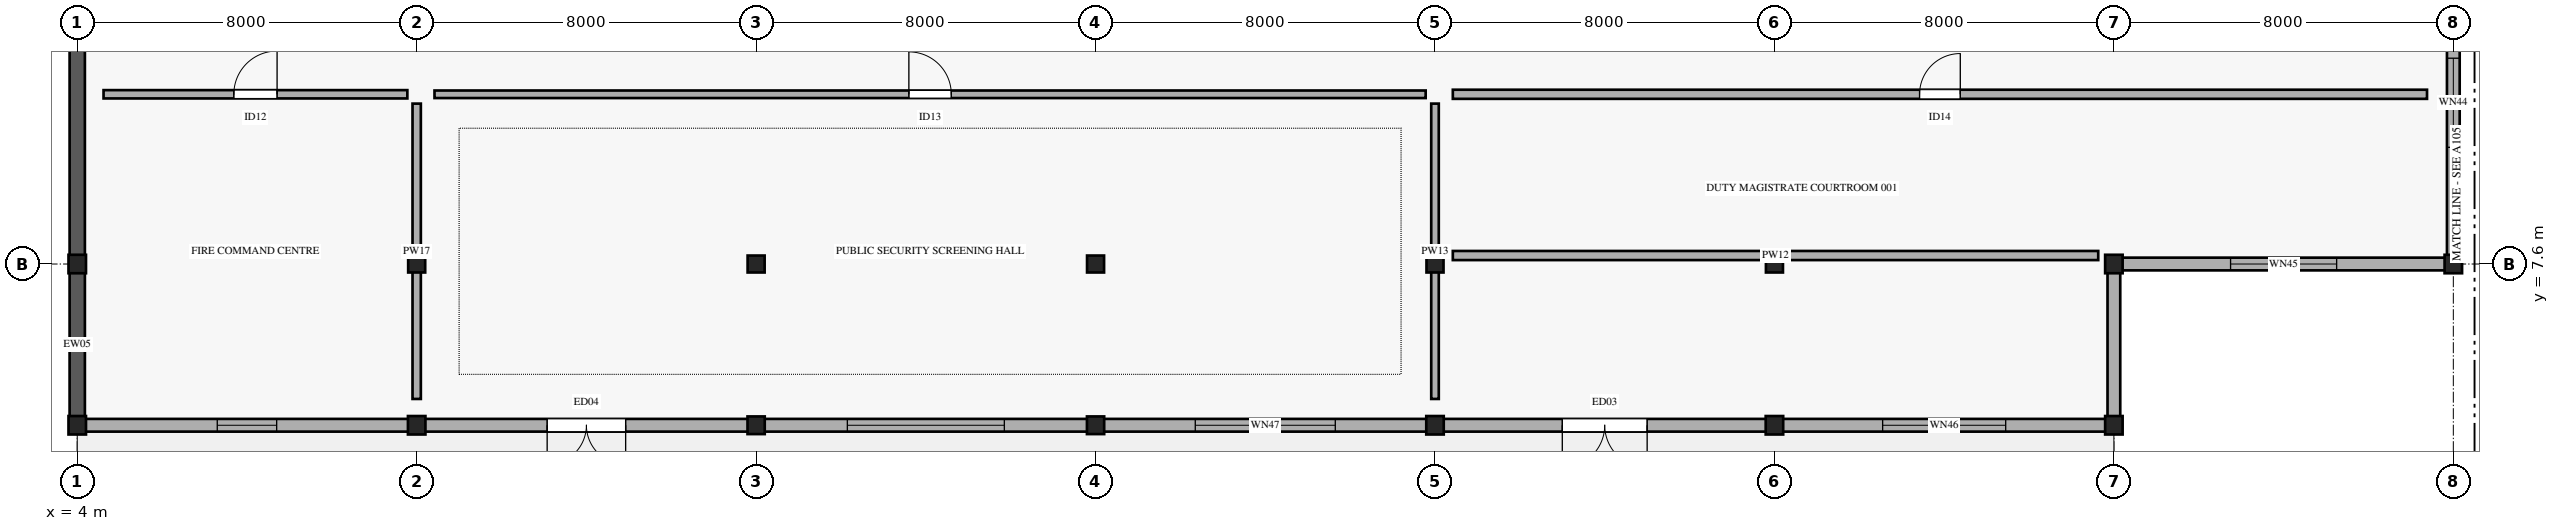
"""IFC4 building model, lengths in metres.
Left out: names, types, materials, properties, quantities, classifications, styles, units other than length and angle.
Written with IfcOpenShell. Run it as: python <this file> out.ifc"""

import sys

from ifc_helpers import new_model, si_unit, direction, frame, frame_2d, origin, origin_2d, place, context, subcontext, project, spatial, rectangle, i_section, extrude, element, fill, save


model = new_model("IFC4")
c1 = context("Model", 3, precision=1e-05, world=origin(), true_north=direction((0.0, 1.0)))
c2 = subcontext(c1, "Body", "Model", "MODEL_VIEW")
j1 = project(units=[si_unit("LENGTHUNIT", "METRE"), si_unit("PLANEANGLEUNIT", "RADIAN")], contexts=[c1])
p1 = place(None, origin())
s1 = spatial("IfcSite", under=j1, at=p1, CompositionType="ELEMENT")
p2 = place(p1, origin())
s2 = spatial("IfcBuilding", under=s1, at=p2, CompositionType="ELEMENT")
p3 = place(p2, origin())
s3 = spatial("IfcBuildingStorey", under=s2, at=p3, CompositionType="ELEMENT", Elevation=0.0)
for number, where, z_axis, x_axis in (
    (1, (4.0, 3.8, 0.0), (0.0, 0.0, 1.0), (1.0, 0.0, 0.0)),
    (2, (4.0, 7.6, 0.0), (0.0, 0.0, 1.0), (1.0, 0.0, 0.0)),
    (3, (12.0, 3.8, 0.0), (0.0, 0.0, 1.0), (1.0, 0.0, 0.0)),
):
    element("IfcColumn", number, at=place(p3, frame(where, z_axis=z_axis, x_axis=x_axis)), inside=s3, PredefinedType="COLUMN", context=c2, shape_type="SweptSolid", body=[
        extrude(i_section(OverallWidth=0.412, OverallDepth=0.435, WebThickness=0.036, FlangeThickness=0.057, FilletRadius=0.015, at=origin_2d()), origin(), (0.0, 0.0, 1.0), 5.185),
    ])
p4 = place(p3, frame((12.0, 7.6, 0.0), z_axis=(0.0, 0.0, 1.0), x_axis=(1.0, 0.0, 0.0)))
e4 = element("IfcColumn", 4, at=p4, inside=s3, PredefinedType="COLUMN", context=c2, shape_type="SweptSolid", body=[
    extrude(i_section(OverallWidth=0.401, OverallDepth=0.399, WebThickness=0.025, FlangeThickness=0.04, FilletRadius=0.015, at=origin_2d()), origin(), (0.0, 0.0, 1.0), 5.185),
])
p5 = place(p3, frame((20.0, 3.8, 0.0), z_axis=(0.0, 0.0, 1.0), x_axis=(1.0, 0.0, 0.0)))
e5 = element("IfcColumn", 5, at=p5, inside=s3, PredefinedType="COLUMN", context=c2, shape_type="SweptSolid", body=[
    extrude(i_section(OverallWidth=0.406, OverallDepth=0.416, WebThickness=0.03, FlangeThickness=0.048, FilletRadius=0.015, at=origin_2d()), origin(), (0.0, 0.0, 1.0), 5.185),
])
p6 = place(p3, frame((20.0, 7.6, 0.0), z_axis=(0.0, 0.0, 1.0), x_axis=(1.0, 0.0, 0.0)))
e6 = element("IfcColumn", 6, at=p6, inside=s3, PredefinedType="COLUMN", context=c2, shape_type="SweptSolid", body=[
    extrude(i_section(OverallWidth=0.401, OverallDepth=0.399, WebThickness=0.025, FlangeThickness=0.04, FilletRadius=0.015, at=origin_2d()), origin(), (0.0, 0.0, 1.0), 5.185),
])
p7 = place(p3, frame((28.0, 3.8, 0.0), z_axis=(0.0, 0.0, 1.0), x_axis=(1.0, 0.0, 0.0)))
e7 = element("IfcColumn", 7, at=p7, inside=s3, PredefinedType="COLUMN", context=c2, shape_type="SweptSolid", body=[
    extrude(i_section(OverallWidth=0.406, OverallDepth=0.416, WebThickness=0.03, FlangeThickness=0.048, FilletRadius=0.015, at=origin_2d()), origin(), (0.0, 0.0, 1.0), 5.185),
])
p8 = place(p3, frame((28.0, 7.6, 0.0), z_axis=(0.0, 0.0, 1.0), x_axis=(1.0, 0.0, 0.0)))
e8 = element("IfcColumn", 8, at=p8, inside=s3, PredefinedType="COLUMN", context=c2, shape_type="SweptSolid", body=[
    extrude(i_section(OverallWidth=0.401, OverallDepth=0.399, WebThickness=0.025, FlangeThickness=0.04, FilletRadius=0.015, at=origin_2d()), origin(), (0.0, 0.0, 1.0), 5.185),
])
p9 = place(p3, frame((36.0, 3.8, 0.0), z_axis=(0.0, 0.0, 1.0), x_axis=(1.0, 0.0, 0.0)))
e9 = element("IfcColumn", 9, at=p9, inside=s3, PredefinedType="COLUMN", context=c2, shape_type="SweptSolid", body=[
    extrude(i_section(OverallWidth=0.412, OverallDepth=0.435, WebThickness=0.036, FlangeThickness=0.057, FilletRadius=0.015, at=origin_2d()), origin(), (0.0, 0.0, 1.0), 5.185),
])
p10 = place(p3, frame((36.0, 7.6, 0.0), z_axis=(0.0, 0.0, 1.0), x_axis=(1.0, 0.0, 0.0)))
e10 = element("IfcColumn", 10, at=p10, inside=s3, PredefinedType="COLUMN", context=c2, shape_type="SweptSolid", body=[
    extrude(i_section(OverallWidth=0.401, OverallDepth=0.399, WebThickness=0.025, FlangeThickness=0.04, FilletRadius=0.015, at=origin_2d()), origin(), (0.0, 0.0, 1.0), 5.185),
])
p11 = place(p3, frame((44.0, 3.8, 0.0), z_axis=(0.0, 0.0, 1.0), x_axis=(1.0, 0.0, 0.0)))
e11 = element("IfcColumn", 11, at=p11, inside=s3, PredefinedType="COLUMN", context=c2, shape_type="SweptSolid", body=[
    extrude(i_section(OverallWidth=0.412, OverallDepth=0.435, WebThickness=0.036, FlangeThickness=0.057, FilletRadius=0.015, at=origin_2d()), origin(), (0.0, 0.0, 1.0), 5.185),
])
p12 = place(p3, frame((44.0, 7.6, 0.0), z_axis=(0.0, 0.0, 1.0), x_axis=(1.0, 0.0, 0.0)))
e12 = element("IfcColumn", 12, at=p12, inside=s3, PredefinedType="COLUMN", context=c2, shape_type="SweptSolid", body=[
    extrude(i_section(OverallWidth=0.401, OverallDepth=0.399, WebThickness=0.025, FlangeThickness=0.04, FilletRadius=0.015, at=origin_2d()), origin(), (0.0, 0.0, 1.0), 5.185),
])
for number, where, z_axis, x_axis in (
    (13, (52.0, 3.8, 0.0), (0.0, 0.0, 1.0), (1.0, 0.0, 0.0)),
    (14, (52.0, 7.6, 0.0), (0.0, 0.0, 1.0), (1.0, 0.0, 0.0)),
    (15, (60.0, 7.6, 0.0), (0.0, 0.0, 1.0), (1.0, 0.0, 0.0)),
):
    element("IfcColumn", number, at=place(p3, frame(where, z_axis=z_axis, x_axis=x_axis)), inside=s3, PredefinedType="COLUMN", context=c2, shape_type="SweptSolid", body=[
        extrude(i_section(OverallWidth=0.412, OverallDepth=0.435, WebThickness=0.036, FlangeThickness=0.057, FilletRadius=0.015, at=origin_2d()), origin(), (0.0, 0.0, 1.0), 5.185),
    ])
p13 = place(p3, frame((4.0, 3.78, 0.0), z_axis=(0.0, 0.0, 1.0), x_axis=(0.0, 1.0, 0.0)))
e16 = element("IfcWall", 16, at=p13, inside=s3, PredefinedType="STANDARD", context=c2, shape_type="SweptSolid", body=[
    extrude(rectangle(XDim=3.84, YDim=0.36, at=frame_2d((1.92, 0.0))), origin(), (0.0, 0.0, 1.0), 5.19),
])
p14 = place(p3, frame((4.0, 7.58, 0.0), z_axis=(0.0, 0.0, 1.0), x_axis=(0.0, 1.0, 0.0)))
e17 = element("IfcWall", 17, at=p14, inside=s3, PredefinedType="STANDARD", context=c2, shape_type="SweptSolid", body=[
    extrude(rectangle(XDim=7.64, YDim=0.36, at=frame_2d((3.82, 0.0))), origin(), (0.0, 0.0, 1.0), 5.19),
])
p15 = place(p3, frame((60.0, 15.22, 0.0), z_axis=(0.0, 0.0, 1.0), x_axis=(0.0, -1.0, 0.0)))
e18 = element("IfcWall", 18, at=p15, inside=s3, PredefinedType="STANDARD", context=c2, shape_type="SweptSolid", body=[
    extrude(rectangle(XDim=7.64, YDim=0.3, at=frame_2d((3.82, 0.0))), origin(), (0.0, 0.0, 1.0), 4.25),
])
p16 = place(p15, frame((2.77, 0.0, 0.75)))
e19 = element("IfcOpeningElement", 19, at=p16, cuts=e18, PredefinedType="OPENING", context=c2, shape_type="SweptSolid", body=[
    extrude(rectangle(XDim=2.1, YDim=1.65, at=frame_2d((1.05, 0.825))), frame((0.0, 0.16, 0.0), z_axis=(0.0, -1.0, 0.0), x_axis=(1.0, 0.0, 0.0)), (0.0, 0.0, 1.0), 0.32),
])
p17 = place(p3, frame((60.02, 7.6, 0.0), z_axis=(0.0, 0.0, 1.0), x_axis=(-1.0, 0.0, 0.0)))
e20 = element("IfcWall", 20, at=p17, inside=s3, PredefinedType="STANDARD", context=c2, shape_type="SweptSolid", body=[
    extrude(rectangle(XDim=8.04, YDim=0.3, at=frame_2d((4.02, 0.0))), origin(), (0.0, 0.0, 1.0), 4.25),
])
p18 = place(p17, frame((2.77, 0.0, 0.75)))
e21 = element("IfcOpeningElement", 21, at=p18, cuts=e20, PredefinedType="OPENING", context=c2, shape_type="SweptSolid", body=[
    extrude(rectangle(XDim=2.5, YDim=1.65, at=frame_2d((1.25, 0.825))), frame((0.0, 0.16, 0.0), z_axis=(0.0, -1.0, 0.0), x_axis=(1.0, 0.0, 0.0)), (0.0, 0.0, 1.0), 0.32),
])
p19 = place(p3, frame((52.0, 7.62, 0.0), z_axis=(0.0, 0.0, 1.0), x_axis=(0.0, -1.0, 0.0)))
e22 = element("IfcWall", 22, at=p19, inside=s3, PredefinedType="STANDARD", context=c2, shape_type="SweptSolid", body=[
    extrude(rectangle(XDim=3.84, YDim=0.3, at=frame_2d((1.92, 0.0))), origin(), (0.0, 0.0, 1.0), 4.25),
])
p20 = place(p3, frame((52.02, 3.8, 0.0), z_axis=(0.0, 0.0, 1.0), x_axis=(-1.0, 0.0, 0.0)))
e23 = element("IfcWall", 23, at=p20, inside=s3, PredefinedType="STANDARD", context=c2, shape_type="SweptSolid", body=[
    extrude(rectangle(XDim=8.04, YDim=0.3, at=frame_2d((4.02, 0.0))), origin(), (0.0, 0.0, 1.0), 4.25),
])
p21 = place(p20, frame((2.57, 0.0, 0.75)))
e24 = element("IfcOpeningElement", 24, at=p21, cuts=e23, PredefinedType="OPENING", context=c2, shape_type="SweptSolid", body=[
    extrude(rectangle(XDim=2.9, YDim=1.65, at=frame_2d((1.45, 0.825))), frame((0.0, 0.16, 0.0), z_axis=(0.0, -1.0, 0.0), x_axis=(1.0, 0.0, 0.0)), (0.0, 0.0, 1.0), 0.32),
])
p22 = place(p3, frame((44.02, 3.8, 0.0), z_axis=(0.0, 0.0, 1.0), x_axis=(-1.0, 0.0, 0.0)))
e25 = element("IfcWall", 25, at=p22, inside=s3, PredefinedType="STANDARD", context=c2, shape_type="SweptSolid", body=[
    extrude(rectangle(XDim=8.04, YDim=0.3, at=frame_2d((4.02, 0.0))), origin(), (0.0, 0.0, 1.0), 4.25),
])
p23 = place(p22, frame((3.02, 0.0, 0.0)))
e26 = element("IfcOpeningElement", 26, at=p23, cuts=e25, PredefinedType="OPENING", context=c2, shape_type="SweptSolid", body=[
    extrude(rectangle(XDim=2.0, YDim=2.4, at=frame_2d((1.0, 1.2))), frame((0.0, 0.16, 0.0), z_axis=(0.0, -1.0, 0.0), x_axis=(1.0, 0.0, 0.0)), (0.0, 0.0, 1.0), 0.32),
])
p24 = place(p3, frame((36.02, 3.8, 0.0), z_axis=(0.0, 0.0, 1.0), x_axis=(-1.0, 0.0, 0.0)))
e27 = element("IfcWall", 27, at=p24, inside=s3, PredefinedType="STANDARD", context=c2, shape_type="SweptSolid", body=[
    extrude(rectangle(XDim=8.04, YDim=0.3, at=frame_2d((4.02, 0.0))), origin(), (0.0, 0.0, 1.0), 4.25),
])
p25 = place(p24, frame((2.37, 0.0, 0.75)))
e28 = element("IfcOpeningElement", 28, at=p25, cuts=e27, PredefinedType="OPENING", context=c2, shape_type="SweptSolid", body=[
    extrude(rectangle(XDim=3.3, YDim=1.65, at=frame_2d((1.65, 0.825))), frame((0.0, 0.16, 0.0), z_axis=(0.0, -1.0, 0.0), x_axis=(1.0, 0.0, 0.0)), (0.0, 0.0, 1.0), 0.32),
])
p26 = place(p3, frame((28.02, 3.8, 0.0), z_axis=(0.0, 0.0, 1.0), x_axis=(-1.0, 0.0, 0.0)))
e29 = element("IfcWall", 29, at=p26, inside=s3, PredefinedType="STANDARD", context=c2, shape_type="SweptSolid", body=[
    extrude(rectangle(XDim=8.04, YDim=0.3, at=frame_2d((4.02, 0.0))), origin(), (0.0, 0.0, 1.0), 4.25),
])
p27 = place(p26, frame((2.17, 0.0, 0.75)))
e30 = element("IfcOpeningElement", 30, at=p27, cuts=e29, PredefinedType="OPENING", context=c2, shape_type="SweptSolid", body=[
    extrude(rectangle(XDim=3.7, YDim=1.65, at=frame_2d((1.85, 0.825))), frame((0.0, 0.16, 0.0), z_axis=(0.0, -1.0, 0.0), x_axis=(1.0, 0.0, 0.0)), (0.0, 0.0, 1.0), 0.32),
])
p28 = place(p3, frame((20.02, 3.8, 0.0), z_axis=(0.0, 0.0, 1.0), x_axis=(-1.0, 0.0, 0.0)))
e31 = element("IfcWall", 31, at=p28, inside=s3, PredefinedType="STANDARD", context=c2, shape_type="SweptSolid", body=[
    extrude(rectangle(XDim=8.04, YDim=0.3, at=frame_2d((4.02, 0.0))), origin(), (0.0, 0.0, 1.0), 4.25),
])
p29 = place(p28, frame((3.095, 0.0, 0.0)))
e32 = element("IfcOpeningElement", 32, at=p29, cuts=e31, PredefinedType="OPENING", context=c2, shape_type="SweptSolid", body=[
    extrude(rectangle(XDim=1.85, YDim=2.4, at=frame_2d((0.925, 1.2))), frame((0.0, 0.16, 0.0), z_axis=(0.0, -1.0, 0.0), x_axis=(1.0, 0.0, 0.0)), (0.0, 0.0, 1.0), 0.32),
])
p30 = place(p3, frame((12.02, 3.8, 0.0), z_axis=(0.0, 0.0, 1.0), x_axis=(-1.0, 0.0, 0.0)))
e33 = element("IfcWall", 33, at=p30, inside=s3, PredefinedType="STANDARD", context=c2, shape_type="SweptSolid", body=[
    extrude(rectangle(XDim=8.04, YDim=0.3, at=frame_2d((4.02, 0.0))), origin(), (0.0, 0.0, 1.0), 4.25),
])
p31 = place(p30, frame((3.32, 0.0, 0.75)))
e34 = element("IfcOpeningElement", 34, at=p31, cuts=e33, PredefinedType="OPENING", context=c2, shape_type="SweptSolid", body=[
    extrude(rectangle(XDim=1.4, YDim=2.0, at=frame_2d((0.7, 1.0))), frame((0.0, 0.16, 0.0), z_axis=(0.0, -1.0, 0.0), x_axis=(1.0, 0.0, 0.0)), (0.0, 0.0, 1.0), 0.32),
])
p32 = place(p3, frame((4.62, 11.6, 0.0), z_axis=(0.0, 0.0, 1.0), x_axis=(1.0, 0.0, 0.0)))
e35 = element("IfcWall", 35, at=p32, inside=s3, PredefinedType="PARTITIONING", context=c2, shape_type="SweptSolid", body=[
    extrude(rectangle(XDim=7.16, YDim=0.196, at=frame_2d((3.58, 0.0))), origin(), (0.0, 0.0, 1.0), 4.05),
])
p33 = place(p32, frame((3.07, 0.0, 0.0)))
e36 = element("IfcOpeningElement", 36, at=p33, cuts=e35, PredefinedType="OPENING", context=c2, shape_type="SweptSolid", body=[
    extrude(rectangle(XDim=1.02, YDim=2.25, at=frame_2d((0.51, 1.125))), frame((0.0, 0.108, 0.0), z_axis=(0.0, -1.0, 0.0), x_axis=(1.0, 0.0, 0.0)), (0.0, 0.0, 1.0), 0.216),
])
p34 = place(p3, frame((12.0, 4.42, 0.0), z_axis=(0.0, 0.0, 1.0), x_axis=(0.0, 1.0, 0.0)))
e37 = element("IfcWall", 37, at=p34, inside=s3, PredefinedType="PARTITIONING", context=c2, shape_type="SweptSolid", body=[
    extrude(rectangle(XDim=6.96, YDim=0.196, at=frame_2d((3.48, 0.0))), origin(), (0.0, 0.0, 1.0), 4.05),
])
p35 = place(p3, frame((12.42, 11.6, 0.0), z_axis=(0.0, 0.0, 1.0), x_axis=(1.0, 0.0, 0.0)))
e38 = element("IfcWall", 38, at=p35, inside=s3, PredefinedType="PARTITIONING", context=c2, shape_type="SweptSolid", body=[
    extrude(rectangle(XDim=23.36, YDim=0.178, at=frame_2d((11.68, 0.0))), origin(), (0.0, 0.0, 1.0), 4.05),
])
p36 = place(p35, frame((11.18, 0.0, 0.0)))
e39 = element("IfcOpeningElement", 39, at=p36, cuts=e38, PredefinedType="OPENING", context=c2, shape_type="SweptSolid", body=[
    extrude(rectangle(XDim=1.0, YDim=2.3, at=frame_2d((0.5, 1.15))), frame((0.0, 0.099, 0.0), z_axis=(0.0, -1.0, 0.0), x_axis=(1.0, 0.0, 0.0)), (0.0, 0.0, 1.0), 0.198),
])
p37 = place(p3, frame((36.0, 4.42, 0.0), z_axis=(0.0, 0.0, 1.0), x_axis=(0.0, 1.0, 0.0)))
e40 = element("IfcWall", 40, at=p37, inside=s3, PredefinedType="PARTITIONING", context=c2, shape_type="SweptSolid", body=[
    extrude(rectangle(XDim=6.96, YDim=0.178, at=frame_2d((3.48, 0.0))), origin(), (0.0, 0.0, 1.0), 4.05),
])
p38 = place(p3, frame((36.42, 11.6, 0.0), z_axis=(0.0, 0.0, 1.0), x_axis=(1.0, 0.0, 0.0)))
e41 = element("IfcWall", 41, at=p38, inside=s3, PredefinedType="PARTITIONING", context=c2, shape_type="SweptSolid", body=[
    extrude(rectangle(XDim=22.96, YDim=0.215, at=frame_2d((11.48, 0.0))), origin(), (0.0, 0.0, 1.0), 4.05),
])
p39 = place(p38, frame((11.0, 0.0, 0.0)))
e42 = element("IfcOpeningElement", 42, at=p39, cuts=e41, PredefinedType="OPENING", context=c2, shape_type="SweptSolid", body=[
    extrude(rectangle(XDim=0.96, YDim=2.25, at=frame_2d((0.48, 1.125))), frame((0.0, 0.117, 0.0), z_axis=(0.0, -1.0, 0.0), x_axis=(1.0, 0.0, 0.0)), (0.0, 0.0, 1.0), 0.235),
])
p40 = place(p3, frame((36.42, 7.8, 0.0), z_axis=(0.0, 0.0, 1.0), x_axis=(1.0, 0.0, 0.0)))
e43 = element("IfcWall", 43, at=p40, inside=s3, PredefinedType="PARTITIONING", context=c2, shape_type="SweptSolid", body=[
    extrude(rectangle(XDim=15.211, YDim=0.215, at=frame_2d((7.605, 0.0))), origin(), (0.0, 0.0, 1.0), 4.05),
])
p41 = place(p16, origin())
e44 = element("IfcWindow", 44, at=p41, inside=s3, PartitioningType="SINGLE_PANEL", PredefinedType="WINDOW", context=c2, shape_type="SweptSolid", body=[
    extrude(rectangle(XDim=2.1, YDim=1.65, at=frame_2d((1.05, 0.825))), frame((0.0, 0.03, 0.0), z_axis=(0.0, -1.0, 0.0), x_axis=(1.0, 0.0, 0.0)), (0.0, 0.0, 1.0), 0.06),
])
fill(e19, e44)
p42 = place(p18, origin())
e45 = element("IfcWindow", 45, at=p42, inside=s3, PartitioningType="SINGLE_PANEL", PredefinedType="WINDOW", context=c2, shape_type="SweptSolid", body=[
    extrude(rectangle(XDim=2.5, YDim=1.65, at=frame_2d((1.25, 0.825))), frame((0.0, 0.03, 0.0), z_axis=(0.0, -1.0, 0.0), x_axis=(1.0, 0.0, 0.0)), (0.0, 0.0, 1.0), 0.06),
])
fill(e21, e45)
p43 = place(p21, origin())
e46 = element("IfcWindow", 46, at=p43, inside=s3, PartitioningType="SINGLE_PANEL", PredefinedType="WINDOW", context=c2, shape_type="SweptSolid", body=[
    extrude(rectangle(XDim=2.9, YDim=1.65, at=frame_2d((1.45, 0.825))), frame((0.0, 0.03, 0.0), z_axis=(0.0, -1.0, 0.0), x_axis=(1.0, 0.0, 0.0)), (0.0, 0.0, 1.0), 0.06),
])
fill(e24, e46)
p44 = place(p23, origin())
e47 = element("IfcDoor", 47, at=p44, inside=s3, OperationType="DOUBLE_DOOR_SINGLE_SWING", PredefinedType="DOOR", context=c2, shape_type="SweptSolid", body=[
    extrude(rectangle(XDim=2.0, YDim=2.4, at=frame_2d((1.0, 1.2))), frame((0.0, 0.025, 0.0), z_axis=(0.0, -1.0, 0.0), x_axis=(1.0, 0.0, 0.0)), (0.0, 0.0, 1.0), 0.05),
])
fill(e26, e47)
p45 = place(p25, origin())
e48 = element("IfcWindow", 48, at=p45, inside=s3, PartitioningType="SINGLE_PANEL", PredefinedType="WINDOW", context=c2, shape_type="SweptSolid", body=[
    extrude(rectangle(XDim=3.3, YDim=1.65, at=frame_2d((1.65, 0.825))), frame((0.0, 0.03, 0.0), z_axis=(0.0, -1.0, 0.0), x_axis=(1.0, 0.0, 0.0)), (0.0, 0.0, 1.0), 0.06),
])
fill(e28, e48)
p46 = place(p27, origin())
e49 = element("IfcWindow", 49, at=p46, inside=s3, PartitioningType="SINGLE_PANEL", PredefinedType="WINDOW", context=c2, shape_type="SweptSolid", body=[
    extrude(rectangle(XDim=3.7, YDim=1.65, at=frame_2d((1.85, 0.825))), frame((0.0, 0.03, 0.0), z_axis=(0.0, -1.0, 0.0), x_axis=(1.0, 0.0, 0.0)), (0.0, 0.0, 1.0), 0.06),
])
fill(e30, e49)
p47 = place(p29, origin())
e50 = element("IfcDoor", 50, at=p47, inside=s3, OperationType="DOUBLE_DOOR_SINGLE_SWING", PredefinedType="DOOR", context=c2, shape_type="SweptSolid", body=[
    extrude(rectangle(XDim=1.85, YDim=2.4, at=frame_2d((0.925, 1.2))), frame((0.0, 0.025, 0.0), z_axis=(0.0, -1.0, 0.0), x_axis=(1.0, 0.0, 0.0)), (0.0, 0.0, 1.0), 0.05),
])
fill(e32, e50)
p48 = place(p31, origin())
e51 = element("IfcWindow", 51, at=p48, inside=s3, PartitioningType="SINGLE_PANEL", PredefinedType="WINDOW", context=c2, shape_type="SweptSolid", body=[
    extrude(rectangle(XDim=1.4, YDim=2.0, at=frame_2d((0.7, 1.0))), frame((0.0, 0.03, 0.0), z_axis=(0.0, -1.0, 0.0), x_axis=(1.0, 0.0, 0.0)), (0.0, 0.0, 1.0), 0.06),
])
fill(e34, e51)
p49 = place(p33, origin())
e52 = element("IfcDoor", 52, at=p49, inside=s3, OperationType="SINGLE_SWING_RIGHT", PredefinedType="DOOR", context=c2, shape_type="SweptSolid", body=[
    extrude(rectangle(XDim=1.02, YDim=2.25, at=frame_2d((0.51, 1.125))), frame((0.0, 0.025, 0.0), z_axis=(0.0, -1.0, 0.0), x_axis=(1.0, 0.0, 0.0)), (0.0, 0.0, 1.0), 0.05),
])
fill(e36, e52)
p50 = place(p36, origin())
e53 = element("IfcDoor", 53, at=p50, inside=s3, OperationType="SINGLE_SWING_LEFT", PredefinedType="DOOR", context=c2, shape_type="SweptSolid", body=[
    extrude(rectangle(XDim=1.0, YDim=2.3, at=frame_2d((0.5, 1.15))), frame((0.0, 0.025, 0.0), z_axis=(0.0, -1.0, 0.0), x_axis=(1.0, 0.0, 0.0)), (0.0, 0.0, 1.0), 0.05),
])
fill(e39, e53)
p51 = place(p39, origin())
e54 = element("IfcDoor", 54, at=p51, inside=s3, OperationType="SINGLE_SWING_RIGHT", PredefinedType="DOOR", context=c2, shape_type="SweptSolid", body=[
    extrude(rectangle(XDim=0.96, YDim=2.25, at=frame_2d((0.48, 1.125))), frame((0.0, 0.025, 0.0), z_axis=(0.0, -1.0, 0.0), x_axis=(1.0, 0.0, 0.0)), (0.0, 0.0, 1.0), 0.05),
])
fill(e42, e54)
save(model, sys.argv[1])
